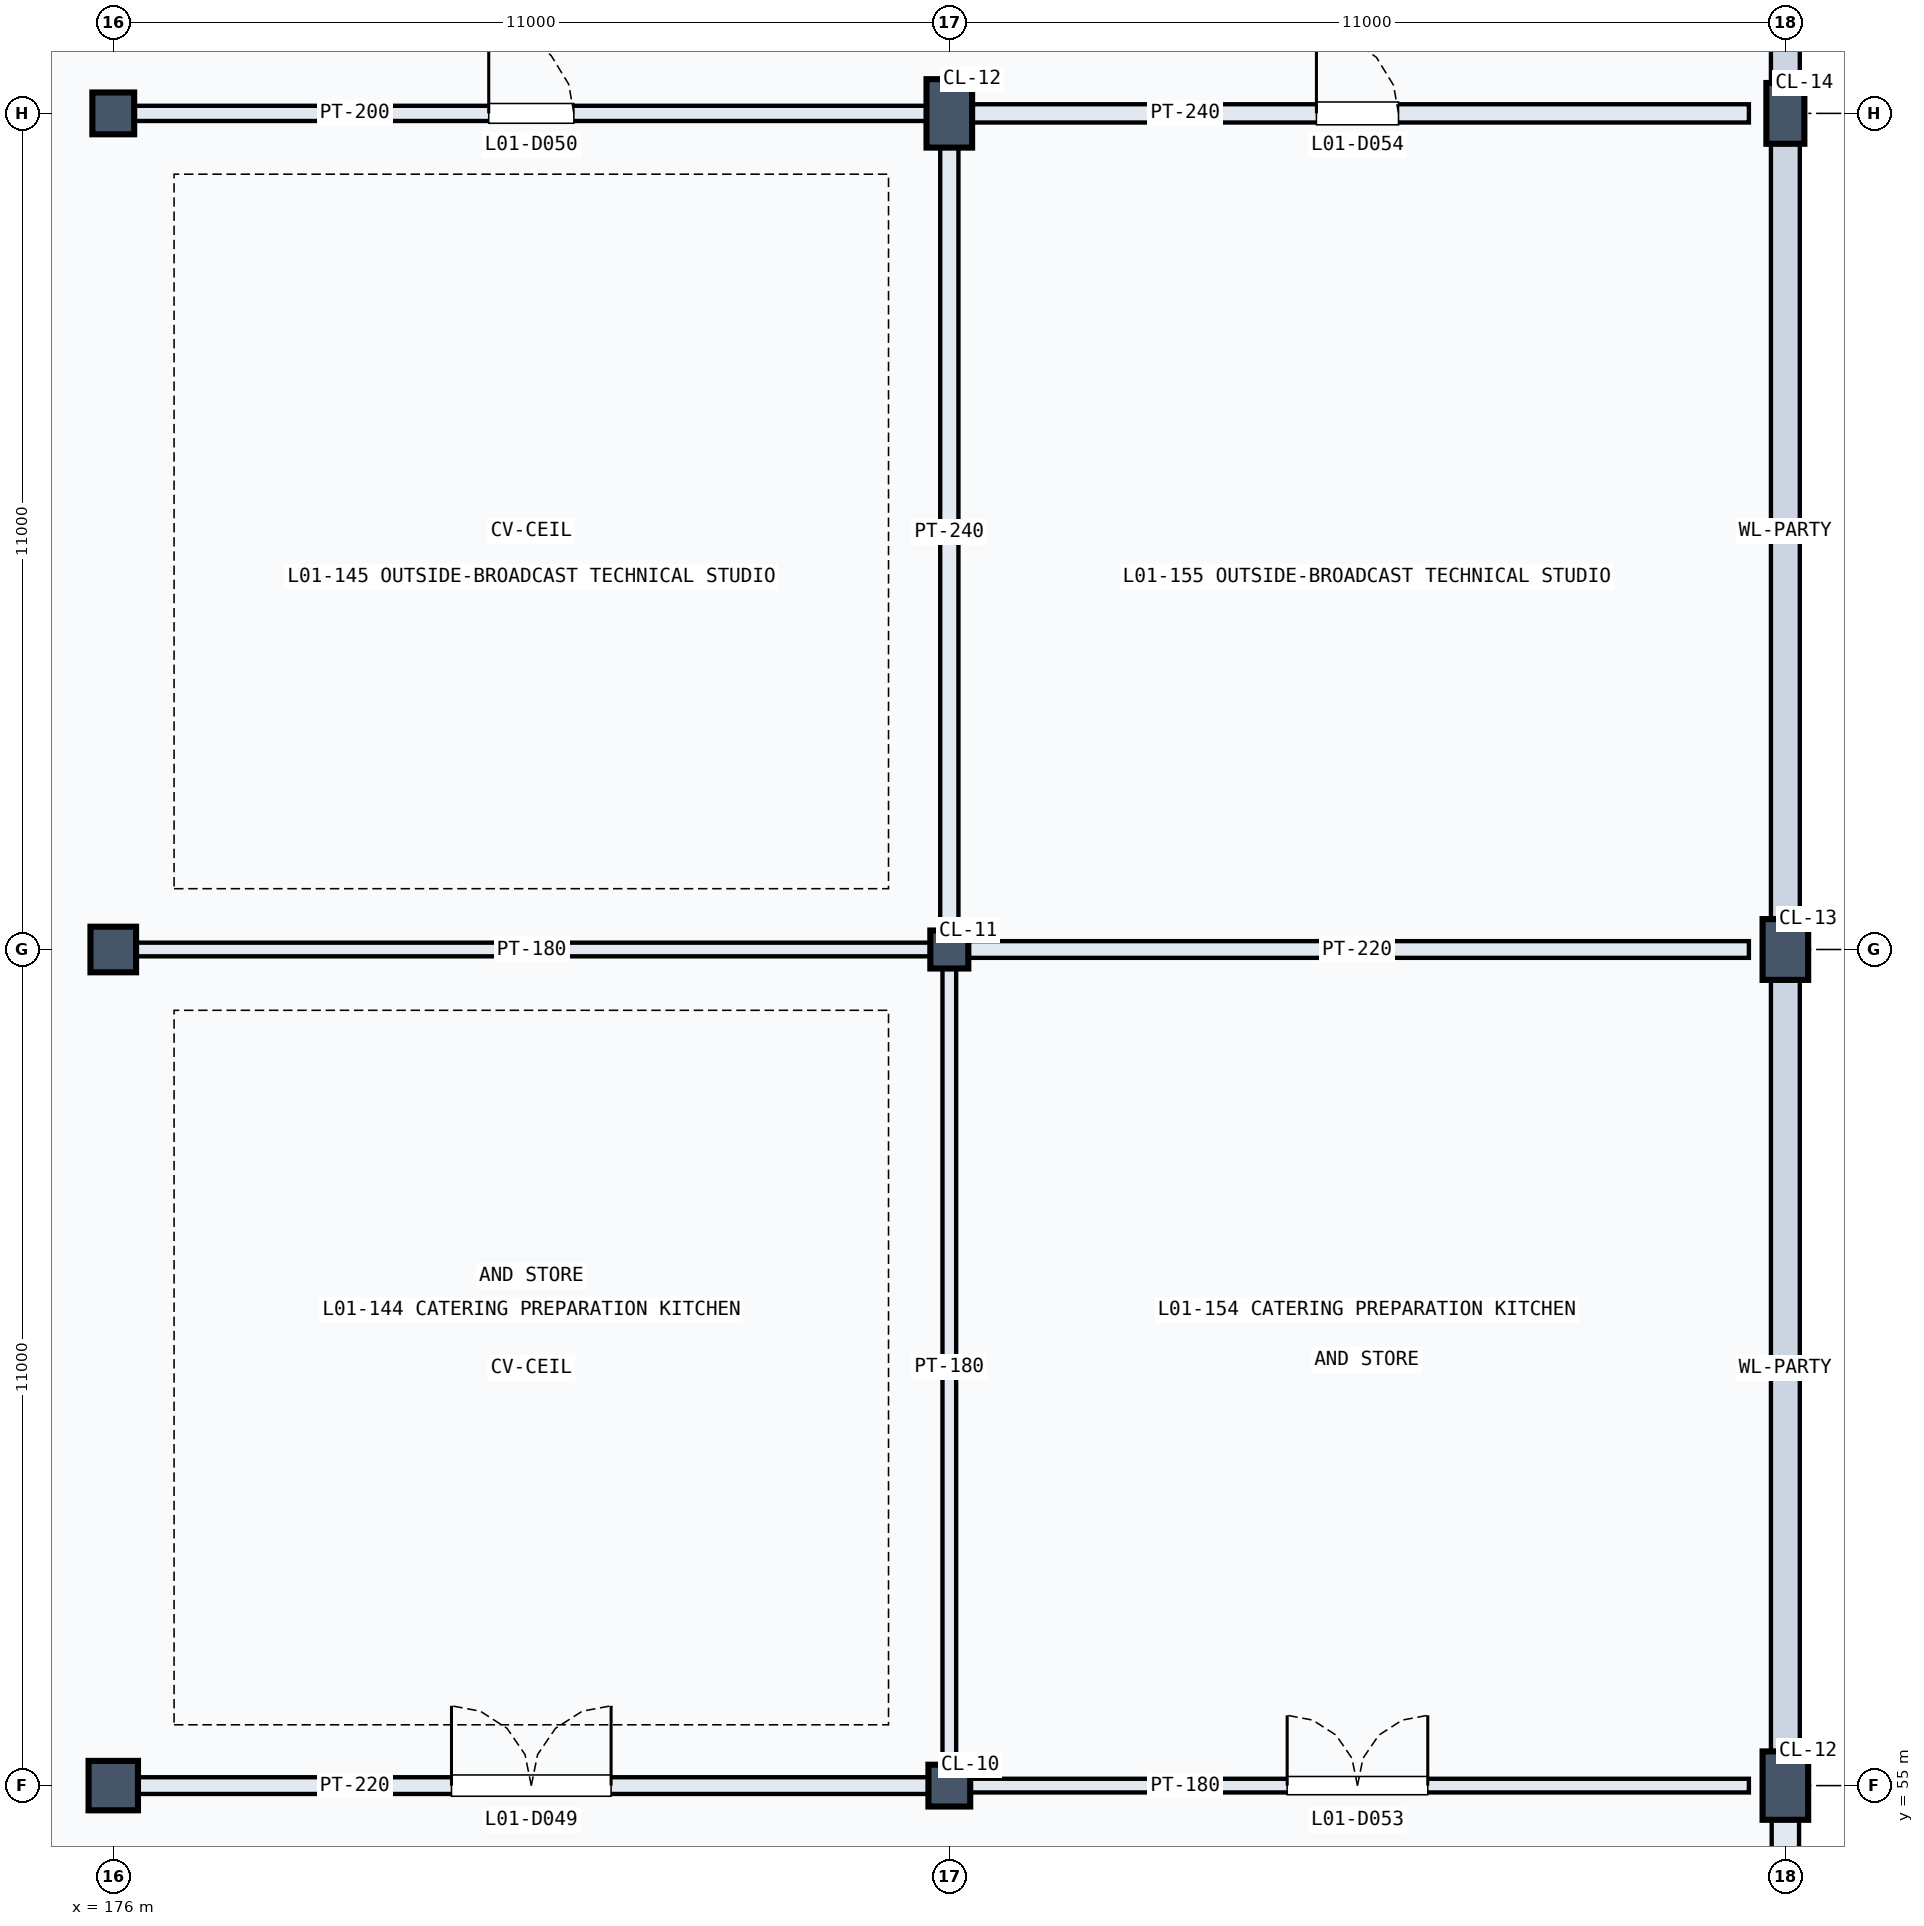
"""IFC4 building model, lengths in metres.
Left out: names, types, materials, properties, quantities, classifications, styles, units other than length and angle.
Written with IfcOpenShell. Run it as: python <this file> out.ifc"""

import sys

from ifc_helpers import new_model, si_unit, direction, frame, frame_2d, origin, origin_2d, place, context, subcontext, project, spatial, rectangle, extrude, element, fill, save


model = new_model("IFC4")
c1 = context("Model", 3, precision=1e-05, world=origin(), true_north=direction((0.0, 1.0)))
c2 = subcontext(c1, "Body", "Model", "MODEL_VIEW")
j1 = project(units=[si_unit("LENGTHUNIT", "METRE"), si_unit("PLANEANGLEUNIT", "RADIAN")], contexts=[c1])
p1 = place(None, origin())
s1 = spatial("IfcSite", under=j1, at=p1, CompositionType="ELEMENT")
p2 = place(p1, origin())
s2 = spatial("IfcBuilding", under=s1, at=p2, CompositionType="ELEMENT")
p3 = place(p2, frame((0.0, 0.0, 5.4)))
s3 = spatial("IfcBuildingStorey", under=s2, at=p3, CompositionType="ELEMENT", Elevation=5.4)
p4 = place(p3, frame((176.0, 55.0, 0.0), z_axis=(0.0, 0.0, 1.0), x_axis=(1.0, 0.0, 0.0)))
e1 = element("IfcColumn", 1, at=p4, inside=s3, PredefinedType="COLUMN", context=c2, shape_type="SweptSolid", body=[
    extrude(rectangle(XDim=0.65, YDim=0.65, at=origin_2d()), origin(), (0.0, 0.0, 1.0), 4.8),
])
p5 = place(p3, frame((176.0, 66.0, 0.0), z_axis=(0.0, 0.0, 1.0), x_axis=(1.0, 0.0, 0.0)))
e2 = element("IfcColumn", 2, at=p5, inside=s3, PredefinedType="COLUMN", context=c2, shape_type="SweptSolid", body=[
    extrude(rectangle(XDim=0.6, YDim=0.6, at=origin_2d()), origin(), (0.0, 0.0, 1.0), 4.8),
])
for number, where, z_axis, x_axis in (
    (3, (176.0, 77.0, 0.0), (0.0, 0.0, 1.0), (1.0, 0.0, 0.0)),
    (4, (187.0, 55.0, 0.0), (0.0, 0.0, 1.0), (1.0, 0.0, 0.0)),
):
    element("IfcColumn", number, at=place(p3, frame(where, z_axis=z_axis, x_axis=x_axis)), inside=s3, PredefinedType="COLUMN", context=c2, shape_type="SweptSolid", body=[
        extrude(rectangle(XDim=0.55, YDim=0.55, at=origin_2d()), origin(), (0.0, 0.0, 1.0), 4.8),
    ])
p6 = place(p3, frame((187.0, 66.0, 0.0), z_axis=(0.0, 0.0, 1.0), x_axis=(1.0, 0.0, 0.0)))
e5 = element("IfcColumn", 5, at=p6, inside=s3, PredefinedType="COLUMN", context=c2, shape_type="SweptSolid", body=[
    extrude(rectangle(XDim=0.5, YDim=0.5, at=origin_2d()), origin(), (0.0, 0.0, 1.0), 4.8),
])
for number, where, z_axis, x_axis in (
    (6, (187.0, 77.0, 0.0), (0.0, 0.0, 1.0), (1.0, 0.0, 0.0)),
    (7, (198.0, 55.0, 0.0), (0.0, 0.0, 1.0), (1.0, 0.0, 0.0)),
):
    element("IfcColumn", number, at=place(p3, frame(where, z_axis=z_axis, x_axis=x_axis)), inside=s3, PredefinedType="COLUMN", context=c2, shape_type="SweptSolid", body=[
        extrude(rectangle(XDim=0.6, YDim=0.9, at=origin_2d()), origin(), (0.0, 0.0, 1.0), 4.8),
    ])
p7 = place(p3, frame((198.0, 66.0, 0.0), z_axis=(0.0, 0.0, 1.0), x_axis=(1.0, 0.0, 0.0)))
e8 = element("IfcColumn", 8, at=p7, inside=s3, PredefinedType="COLUMN", context=c2, shape_type="SweptSolid", body=[
    extrude(rectangle(XDim=0.6, YDim=0.8, at=origin_2d()), origin(), (0.0, 0.0, 1.0), 4.8),
])
p8 = place(p3, frame((198.0, 77.0, 0.0), z_axis=(0.0, 0.0, 1.0), x_axis=(1.0, 0.0, 0.0)))
e9 = element("IfcColumn", 9, at=p8, inside=s3, PredefinedType="COLUMN", context=c2, shape_type="SweptSolid", body=[
    extrude(rectangle(XDim=0.5, YDim=0.8, at=origin_2d()), origin(), (0.0, 0.0, 1.0), 4.8),
])
p9 = place(p3, frame((198.0, 44.21, 0.0), z_axis=(0.0, 0.0, 1.0), x_axis=(0.0, 1.0, 0.0)))
e10 = element("IfcWall", 10, at=p9, inside=s3, PredefinedType="SOLIDWALL", context=c2, shape_type="SweptSolid", body=[
    extrude(rectangle(XDim=10.57, YDim=0.36, at=frame_2d((5.285, 0.0))), origin(), (0.0, 0.0, 1.0), 3.705),
])
p10 = place(p9, frame((4.135, 0.0, 0.85)))
e11 = element("IfcOpeningElement", 11, at=p10, cuts=e10, PredefinedType="OPENING", context=c2, shape_type="SweptSolid", body=[
    extrude(rectangle(XDim=2.3, YDim=2.05, at=frame_2d((1.15, 1.025))), frame((0.0, 0.19, 0.0), z_axis=(0.0, -1.0, 0.0), x_axis=(1.0, 0.0, 0.0)), (0.0, 0.0, 1.0), 0.38),
])
for number, where, z_axis, x_axis in (
    (12, (198.0, 55.22, 0.0), (0.0, 0.0, 1.0), (0.0, 1.0, 0.0)),
    (13, (198.0, 66.22, 0.0), (0.0, 0.0, 1.0), (0.0, 1.0, 0.0)),
    (14, (198.0, 77.22, 0.0), (0.0, 0.0, 1.0), (0.0, 1.0, 0.0)),
):
    element("IfcWall", number, at=place(p3, frame(where, z_axis=z_axis, x_axis=x_axis)), inside=s3, PredefinedType="SOLIDWALL", context=c2, shape_type="SweptSolid", body=[
        extrude(rectangle(XDim=10.56, YDim=0.38, at=frame_2d((5.28, 0.0))), origin(), (0.0, 0.0, 1.0), 3.705),
    ])
p11 = place(p3, frame((176.22, 55.0, 0.0), z_axis=(0.0, 0.0, 1.0), x_axis=(1.0, 0.0, 0.0)))
e15 = element("IfcWall", 15, at=p11, inside=s3, PredefinedType="PARTITIONING", context=c2, shape_type="SweptSolid", body=[
    extrude(rectangle(XDim=10.56, YDim=0.22, at=frame_2d((5.28, 0.0))), origin(), (0.0, 0.0, 1.0), 3.59),
])
p12 = place(p11, frame((4.23, 0.0, 0.0)))
e16 = element("IfcOpeningElement", 16, at=p12, cuts=e15, PredefinedType="OPENING", context=c2, shape_type="SweptSolid", body=[
    extrude(rectangle(XDim=2.1, YDim=2.2, at=frame_2d((1.05, 1.1))), frame((0.0, 0.12, 0.0), z_axis=(0.0, -1.0, 0.0), x_axis=(1.0, 0.0, 0.0)), (0.0, 0.0, 1.0), 0.24),
])
p13 = place(p3, frame((176.22, 77.0, 0.0), z_axis=(0.0, 0.0, 1.0), x_axis=(1.0, 0.0, 0.0)))
e17 = element("IfcWall", 17, at=p13, inside=s3, PredefinedType="PARTITIONING", context=c2, shape_type="SweptSolid", body=[
    extrude(rectangle(XDim=10.56, YDim=0.2, at=frame_2d((5.28, 0.0))), origin(), (0.0, 0.0, 1.0), 3.705),
])
p14 = place(p13, frame((4.72, 0.0, 0.0)))
e18 = element("IfcOpeningElement", 18, at=p14, cuts=e17, PredefinedType="OPENING", context=c2, shape_type="SweptSolid", body=[
    extrude(rectangle(XDim=1.12, YDim=2.25, at=frame_2d((0.56, 1.125))), frame((0.0, 0.11, 0.0), z_axis=(0.0, -1.0, 0.0), x_axis=(1.0, 0.0, 0.0)), (0.0, 0.0, 1.0), 0.22),
])
p15 = place(p3, frame((187.22, 55.0, 0.0), z_axis=(0.0, 0.0, 1.0), x_axis=(1.0, 0.0, 0.0)))
e19 = element("IfcWall", 19, at=p15, inside=s3, PredefinedType="PARTITIONING", context=c2, shape_type="SweptSolid", body=[
    extrude(rectangle(XDim=10.3, YDim=0.18, at=frame_2d((5.15, 0.0))), origin(), (0.0, 0.0, 1.0), 3.64),
])
p16 = place(p15, frame((4.225, 0.0, 0.0)))
e20 = element("IfcOpeningElement", 20, at=p16, cuts=e19, PredefinedType="OPENING", context=c2, shape_type="SweptSolid", body=[
    extrude(rectangle(XDim=1.85, YDim=2.35, at=frame_2d((0.925, 1.175))), frame((0.0, 0.1, 0.0), z_axis=(0.0, -1.0, 0.0), x_axis=(1.0, 0.0, 0.0)), (0.0, 0.0, 1.0), 0.2),
])
p17 = place(p3, frame((187.22, 77.0, 0.0), z_axis=(0.0, 0.0, 1.0), x_axis=(1.0, 0.0, 0.0)))
e21 = element("IfcWall", 21, at=p17, inside=s3, PredefinedType="PARTITIONING", context=c2, shape_type="SweptSolid", body=[
    extrude(rectangle(XDim=10.3, YDim=0.24, at=frame_2d((5.15, 0.0))), origin(), (0.0, 0.0, 1.0), 3.705),
])
p18 = place(p17, frame((4.61, 0.0, 0.0)))
e22 = element("IfcOpeningElement", 22, at=p18, cuts=e21, PredefinedType="OPENING", context=c2, shape_type="SweptSolid", body=[
    extrude(rectangle(XDim=1.08, YDim=2.15, at=frame_2d((0.54, 1.075))), frame((0.0, 0.13, 0.0), z_axis=(0.0, -1.0, 0.0), x_axis=(1.0, 0.0, 0.0)), (0.0, 0.0, 1.0), 0.26),
])
p19 = place(p3, frame((176.22, 66.0, 0.0), z_axis=(0.0, 0.0, 1.0), x_axis=(1.0, 0.0, 0.0)))
e23 = element("IfcWall", 23, at=p19, inside=s3, PredefinedType="PARTITIONING", context=c2, shape_type="SweptSolid", body=[
    extrude(rectangle(XDim=10.57, YDim=0.18, at=frame_2d((5.285, 0.0))), origin(), (0.0, 0.0, 1.0), 3.69),
])
p20 = place(p3, frame((187.0, 55.22, 0.0), z_axis=(0.0, 0.0, 1.0), x_axis=(0.0, 1.0, 0.0)))
e24 = element("IfcWall", 24, at=p20, inside=s3, PredefinedType="PARTITIONING", context=c2, shape_type="SweptSolid", body=[
    extrude(rectangle(XDim=10.57, YDim=0.18, at=frame_2d((5.285, 0.0))), origin(), (0.0, 0.0, 1.0), 3.64),
])
p21 = place(p3, frame((187.0, 66.21, 0.0), z_axis=(0.0, 0.0, 1.0), x_axis=(0.0, 1.0, 0.0)))
e25 = element("IfcWall", 25, at=p21, inside=s3, PredefinedType="PARTITIONING", context=c2, shape_type="SweptSolid", body=[
    extrude(rectangle(XDim=10.57, YDim=0.24, at=frame_2d((5.285, 0.0))), origin(), (0.0, 0.0, 1.0), 3.705),
])
p22 = place(p3, frame((187.21, 66.0, 0.0), z_axis=(0.0, 0.0, 1.0), x_axis=(1.0, 0.0, 0.0)))
e26 = element("IfcWall", 26, at=p22, inside=s3, PredefinedType="PARTITIONING", context=c2, shape_type="SweptSolid", body=[
    extrude(rectangle(XDim=10.31, YDim=0.22, at=frame_2d((5.155, 0.0))), origin(), (0.0, 0.0, 1.0), 3.705),
])
p23 = place(p12, origin())
e27 = element("IfcDoor", 27, at=p23, inside=s3, OperationType="DOUBLE_DOOR_SINGLE_SWING", PredefinedType="DOOR", context=c2, shape_type="SweptSolid", body=[
    extrude(rectangle(XDim=2.1, YDim=2.2, at=frame_2d((1.05, 1.1))), frame((0.0, 0.025, 0.0), z_axis=(0.0, -1.0, 0.0), x_axis=(1.0, 0.0, 0.0)), (0.0, 0.0, 1.0), 0.05),
])
fill(e16, e27)
p24 = place(p14, origin())
e28 = element("IfcDoor", 28, at=p24, inside=s3, OperationType="SINGLE_SWING_LEFT", PredefinedType="DOOR", context=c2, shape_type="SweptSolid", body=[
    extrude(rectangle(XDim=1.12, YDim=2.25, at=frame_2d((0.56, 1.125))), frame((0.0, 0.025, 0.0), z_axis=(0.0, -1.0, 0.0), x_axis=(1.0, 0.0, 0.0)), (0.0, 0.0, 1.0), 0.05),
])
fill(e18, e28)
p25 = place(p16, origin())
e29 = element("IfcDoor", 29, at=p25, inside=s3, OperationType="DOUBLE_DOOR_SINGLE_SWING", PredefinedType="DOOR", context=c2, shape_type="SweptSolid", body=[
    extrude(rectangle(XDim=1.85, YDim=2.35, at=frame_2d((0.925, 1.175))), frame((0.0, 0.025, 0.0), z_axis=(0.0, -1.0, 0.0), x_axis=(1.0, 0.0, 0.0)), (0.0, 0.0, 1.0), 0.05),
])
fill(e20, e29)
p26 = place(p18, origin())
e30 = element("IfcDoor", 30, at=p26, inside=s3, OperationType="SINGLE_SWING_LEFT", PredefinedType="DOOR", context=c2, shape_type="SweptSolid", body=[
    extrude(rectangle(XDim=1.08, YDim=2.15, at=frame_2d((0.54, 1.075))), frame((0.0, 0.025, 0.0), z_axis=(0.0, -1.0, 0.0), x_axis=(1.0, 0.0, 0.0)), (0.0, 0.0, 1.0), 0.05),
])
fill(e22, e30)
save(model, sys.argv[1])
